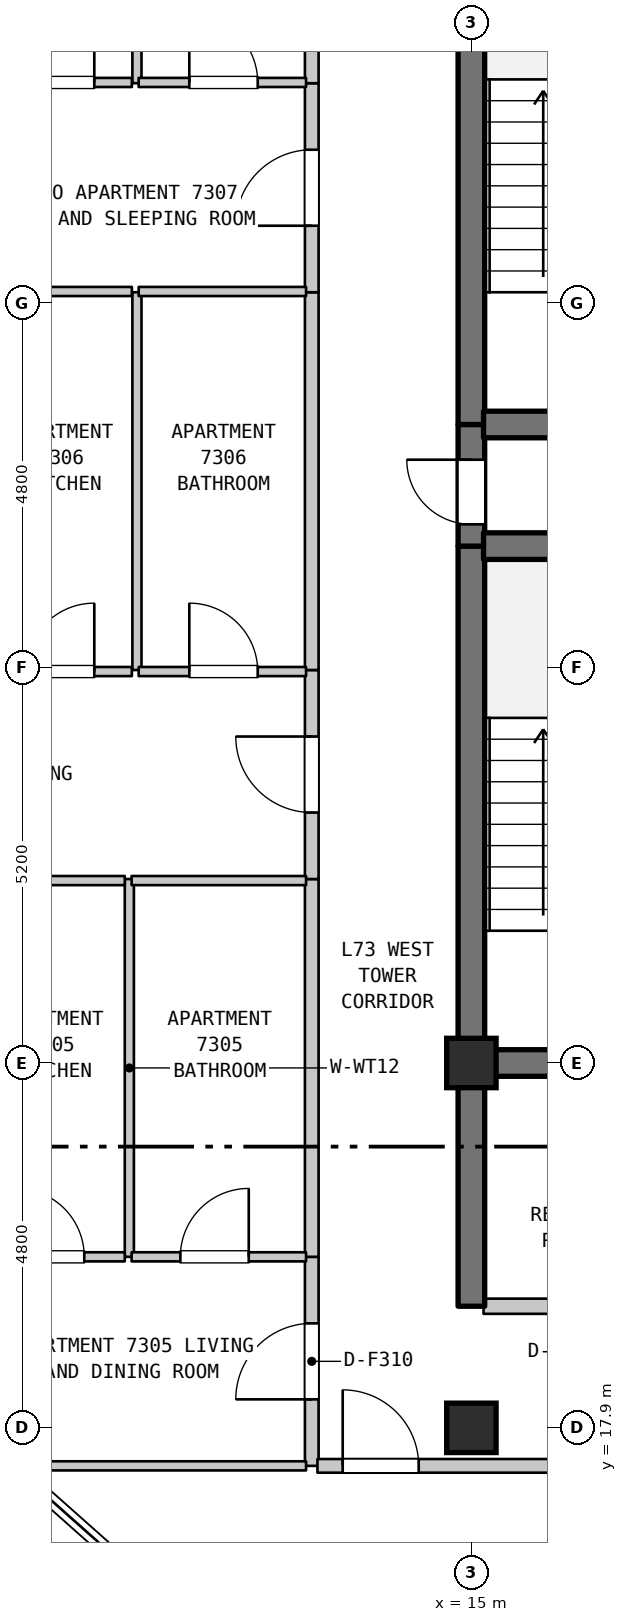
"""IFC4 building model, lengths in metres.
Left out: names, types, materials, properties, quantities, classifications, styles, units other than length and angle.
Written with IfcOpenShell. Run it as: python <this file> out.ifc"""

import sys

from ifc_helpers import new_model, si_unit, direction, frame, frame_2d, origin, origin_2d, place, context, subcontext, project, spatial, rectangle, extrude, element, fill, save


model = new_model("IFC4")
c1 = context("Model", 3, precision=1e-05, world=origin(), true_north=direction((0.0, 1.0)))
c2 = subcontext(c1, "Body", "Model", "MODEL_VIEW")
j1 = project(units=[si_unit("LENGTHUNIT", "METRE"), si_unit("PLANEANGLEUNIT", "RADIAN")], contexts=[c1])
p1 = place(None, origin())
s1 = spatial("IfcSite", under=j1, at=p1, CompositionType="ELEMENT")
p2 = place(p1, origin())
s2 = spatial("IfcBuilding", under=s1, at=p2, CompositionType="ELEMENT")
p3 = place(p2, frame((0.0, 0.0, 291.7)))
s3 = spatial("IfcBuildingStorey", under=s2, at=p3, CompositionType="ELEMENT", Elevation=291.7)
for number, where, z_axis, x_axis in (
    (1, (15.0, 17.9, 0.0), (0.0, 0.0, 1.0), (1.0, 0.0, 0.0)),
    (2, (15.0, 22.7, 0.0), (0.0, 0.0, 1.0), (1.0, 0.0, 0.0)),
):
    element("IfcColumn", number, at=place(p3, frame(where, z_axis=z_axis, x_axis=x_axis)), inside=s3, PredefinedType="COLUMN", context=c2, shape_type="SweptSolid", body=[
        extrude(rectangle(XDim=0.65, YDim=0.65, at=origin_2d()), origin(), (0.0, 0.0, 1.0), 3.7),
    ])
p4 = place(p3, frame((10.5, 20.15, 0.0), z_axis=(0.0, 0.0, 1.0), x_axis=(0.0, 1.0, 0.0)))
e3 = element("IfcWall", 3, at=p4, inside=s3, PredefinedType="PARTITIONING", context=c2, shape_type="SweptSolid", body=[
    extrude(rectangle(XDim=4.97, YDim=0.12, at=frame_2d((2.485, 0.0))), origin(), (0.0, 0.0, 1.0), 3.39),
])
p5 = place(p3, frame((10.6, 27.87, 0.0), z_axis=(0.0, 0.0, 1.0), x_axis=(0.0, 1.0, 0.0)))
e4 = element("IfcWall", 4, at=p5, inside=s3, PredefinedType="PARTITIONING", context=c2, shape_type="SweptSolid", body=[
    extrude(rectangle(XDim=4.97, YDim=0.12, at=frame_2d((2.485, 0.0))), origin(), (0.0, 0.0, 1.0), 3.39),
])
p6 = place(p3, frame((10.6, 35.59, 0.0), z_axis=(0.0, 0.0, 1.0), x_axis=(0.0, 1.0, 0.0)))
e5 = element("IfcWall", 5, at=p6, inside=s3, PredefinedType="PARTITIONING", context=c2, shape_type="SweptSolid", body=[
    extrude(rectangle(XDim=4.51, YDim=0.12, at=frame_2d((2.255, 0.0))), origin(), (0.0, 0.0, 1.0), 3.39),
])
p7 = place(p3, frame((12.9, 17.4, 0.0), z_axis=(0.0, 0.0, 1.0), x_axis=(0.0, 1.0, 0.0)))
e6 = element("IfcWall", 6, at=p7, inside=s3, PredefinedType="STANDARD", context=c2, shape_type="SweptSolid", body=[
    extrude(rectangle(XDim=2.75, YDim=0.18, at=frame_2d((1.375, 0.0))), origin(), (0.0, 0.0, 1.0), 3.39),
])
p8 = place(p7, frame((0.875, 0.0, 0.0)))
e7 = element("IfcOpeningElement", 7, at=p8, cuts=e6, PredefinedType="OPENING", context=c2, shape_type="SweptSolid", body=[
    extrude(rectangle(XDim=1.0, YDim=2.15, at=frame_2d((0.5, 1.075))), frame((0.0, 0.1, 0.0), z_axis=(0.0, -1.0, 0.0), x_axis=(1.0, 0.0, 0.0)), (0.0, 0.0, 1.0), 0.2),
])
p9 = place(p3, frame((12.9, 20.15, 0.0), z_axis=(0.0, 0.0, 1.0), x_axis=(0.0, 1.0, 0.0)))
e8 = element("IfcWall", 8, at=p9, inside=s3, PredefinedType="STANDARD", context=c2, shape_type="SweptSolid", body=[
    extrude(rectangle(XDim=4.97, YDim=0.18, at=frame_2d((2.485, 0.0))), origin(), (0.0, 0.0, 1.0), 3.39),
])
p10 = place(p3, frame((12.9, 25.12, 0.0), z_axis=(0.0, 0.0, 1.0), x_axis=(0.0, 1.0, 0.0)))
e9 = element("IfcWall", 9, at=p10, inside=s3, PredefinedType="STANDARD", context=c2, shape_type="SweptSolid", body=[
    extrude(rectangle(XDim=2.75, YDim=0.18, at=frame_2d((1.375, 0.0))), origin(), (0.0, 0.0, 1.0), 3.39),
])
p11 = place(p10, frame((0.875, 0.0, 0.0)))
e10 = element("IfcOpeningElement", 10, at=p11, cuts=e9, PredefinedType="OPENING", context=c2, shape_type="SweptSolid", body=[
    extrude(rectangle(XDim=1.0, YDim=2.15, at=frame_2d((0.5, 1.075))), frame((0.0, 0.1, 0.0), z_axis=(0.0, -1.0, 0.0), x_axis=(1.0, 0.0, 0.0)), (0.0, 0.0, 1.0), 0.2),
])
p12 = place(p3, frame((12.9, 27.87, 0.0), z_axis=(0.0, 0.0, 1.0), x_axis=(0.0, 1.0, 0.0)))
e11 = element("IfcWall", 11, at=p12, inside=s3, PredefinedType="STANDARD", context=c2, shape_type="SweptSolid", body=[
    extrude(rectangle(XDim=4.97, YDim=0.18, at=frame_2d((2.485, 0.0))), origin(), (0.0, 0.0, 1.0), 3.39),
])
p13 = place(p3, frame((12.9, 32.84, 0.0), z_axis=(0.0, 0.0, 1.0), x_axis=(0.0, 1.0, 0.0)))
e12 = element("IfcWall", 12, at=p13, inside=s3, PredefinedType="STANDARD", context=c2, shape_type="SweptSolid", body=[
    extrude(rectangle(XDim=2.75, YDim=0.18, at=frame_2d((1.375, 0.0))), origin(), (0.0, 0.0, 1.0), 3.39),
])
p14 = place(p13, frame((0.875, 0.0, 0.0)))
e13 = element("IfcOpeningElement", 13, at=p14, cuts=e12, PredefinedType="OPENING", context=c2, shape_type="SweptSolid", body=[
    extrude(rectangle(XDim=1.0, YDim=2.15, at=frame_2d((0.5, 1.075))), frame((0.0, 0.1, 0.0), z_axis=(0.0, -1.0, 0.0), x_axis=(1.0, 0.0, 0.0)), (0.0, 0.0, 1.0), 0.2),
])
p15 = place(p3, frame((12.9, 35.59, 0.0), z_axis=(0.0, 0.0, 1.0), x_axis=(0.0, 1.0, 0.0)))
e14 = element("IfcWall", 14, at=p15, inside=s3, PredefinedType="STANDARD", context=c2, shape_type="SweptSolid", body=[
    extrude(rectangle(XDim=4.51, YDim=0.18, at=frame_2d((2.255, 0.0))), origin(), (0.0, 0.0, 1.0), 3.39),
])
p16 = place(p3, frame((15.0, 19.5, 0.0), z_axis=(0.0, 0.0, 1.0), x_axis=(0.0, 1.0, 0.0)))
e15 = element("IfcWall", 15, at=p16, inside=s3, PredefinedType="SHEAR", context=c2, shape_type="SweptSolid", body=[
    extrude(rectangle(XDim=3.2, YDim=0.35, at=frame_2d((1.6, 0.0))), origin(), (0.0, 0.0, 1.0), 3.39),
])
p17 = place(p3, frame((15.0, 22.7, 0.0), z_axis=(0.0, 0.0, 1.0), x_axis=(0.0, 1.0, 0.0)))
e16 = element("IfcWall", 16, at=p17, inside=s3, PredefinedType="SHEAR", context=c2, shape_type="SweptSolid", body=[
    extrude(rectangle(XDim=6.8, YDim=0.35, at=frame_2d((3.4, 0.0))), origin(), (0.0, 0.0, 1.0), 3.39),
])
p18 = place(p3, frame((15.0, 29.5, 0.0), z_axis=(0.0, 0.0, 1.0), x_axis=(0.0, 1.0, 0.0)))
e17 = element("IfcWall", 17, at=p18, inside=s3, PredefinedType="SHEAR", context=c2, shape_type="SweptSolid", body=[
    extrude(rectangle(XDim=1.6, YDim=0.35, at=frame_2d((0.8, 0.0))), origin(), (0.0, 0.0, 1.0), 3.39),
])
p19 = place(p18, frame((0.287, 0.0, 0.0)))
e18 = element("IfcOpeningElement", 18, at=p19, cuts=e17, PredefinedType="OPENING", context=c2, shape_type="SweptSolid", body=[
    extrude(rectangle(XDim=0.85, YDim=2.1, at=frame_2d((0.425, 1.05))), frame((0.0, 0.185, 0.0), z_axis=(0.0, -1.0, 0.0), x_axis=(1.0, 0.0, 0.0)), (0.0, 0.0, 1.0), 0.37),
])
p20 = place(p3, frame((15.0, 31.1, 0.0), z_axis=(0.0, 0.0, 1.0), x_axis=(0.0, 1.0, 0.0)))
e19 = element("IfcWall", 19, at=p20, inside=s3, PredefinedType="SHEAR", context=c2, shape_type="SweptSolid", body=[
    extrude(rectangle(XDim=6.8, YDim=0.35, at=frame_2d((3.4, 0.0))), origin(), (0.0, 0.0, 1.0), 3.39),
])
p21 = place(p3, frame((8.973, 17.4, 0.0), z_axis=(0.0, 0.0, 1.0), x_axis=(1.0, 0.0, 0.0)))
e20 = element("IfcWall", 20, at=p21, inside=s3, PredefinedType="PARTITIONING", context=c2, shape_type="SweptSolid", body=[
    extrude(rectangle(XDim=3.852, YDim=0.12, at=frame_2d((1.926, 0.0))), origin(), (0.0, 0.0, 1.0), 3.39),
])
p22 = place(p3, frame((12.975, 17.4, 0.0), z_axis=(0.0, 0.0, 1.0), x_axis=(1.0, 0.0, 0.0)))
e21 = element("IfcWall", 21, at=p22, inside=s3, PredefinedType="STANDARD", context=c2, shape_type="SweptSolid", body=[
    extrude(rectangle(XDim=3.18, YDim=0.18, at=frame_2d((1.59, 0.0))), origin(), (0.0, 0.0, 1.0), 3.39),
])
p23 = place(p22, frame((0.332, 0.0, 0.0)))
e22 = element("IfcOpeningElement", 22, at=p23, cuts=e21, PredefinedType="OPENING", context=c2, shape_type="SweptSolid", body=[
    extrude(rectangle(XDim=1.0, YDim=2.15, at=frame_2d((0.5, 1.075))), frame((0.0, 0.1, 0.0), z_axis=(0.0, -1.0, 0.0), x_axis=(1.0, 0.0, 0.0)), (0.0, 0.0, 1.0), 0.2),
])
p24 = place(p3, frame((15.16, 19.5, 0.0), z_axis=(0.0, 0.0, 1.0), x_axis=(1.0, 0.0, 0.0)))
e23 = element("IfcWall", 23, at=p24, inside=s3, PredefinedType="STANDARD", context=c2, shape_type="SweptSolid", body=[
    extrude(rectangle(XDim=3.68, YDim=0.2, at=frame_2d((1.84, 0.0))), origin(), (0.0, 0.0, 1.0), 3.39),
])
p25 = place(p24, frame((1.39, 0.0, 0.0)))
e24 = element("IfcOpeningElement", 24, at=p25, cuts=e23, PredefinedType="OPENING", context=c2, shape_type="SweptSolid", body=[
    extrude(rectangle(XDim=0.9, YDim=2.15, at=frame_2d((0.45, 1.075))), frame((0.0, 0.11, 0.0), z_axis=(0.0, -1.0, 0.0), x_axis=(1.0, 0.0, 0.0)), (0.0, 0.0, 1.0), 0.22),
])
p26 = place(p3, frame((8.473, 20.15, 0.0), z_axis=(0.0, 0.0, 1.0), x_axis=(1.0, 0.0, 0.0)))
e25 = element("IfcWall", 25, at=p26, inside=s3, PredefinedType="PARTITIONING", context=c2, shape_type="SweptSolid", body=[
    extrude(rectangle(XDim=1.967, YDim=0.12, at=frame_2d((0.983, 0.0))), origin(), (0.0, 0.0, 1.0), 3.39),
])
p27 = place(p26, frame((0.534, 0.0, 0.0)))
e26 = element("IfcOpeningElement", 26, at=p27, cuts=e25, PredefinedType="OPENING", context=c2, shape_type="SweptSolid", body=[
    extrude(rectangle(XDim=0.9, YDim=2.15, at=frame_2d((0.45, 1.075))), frame((0.0, 0.07, 0.0), z_axis=(0.0, -1.0, 0.0), x_axis=(1.0, 0.0, 0.0)), (0.0, 0.0, 1.0), 0.14),
])
p28 = place(p3, frame((10.53, 20.15, 0.0), z_axis=(0.0, 0.0, 1.0), x_axis=(1.0, 0.0, 0.0)))
e27 = element("IfcWall", 27, at=p28, inside=s3, PredefinedType="PARTITIONING", context=c2, shape_type="SweptSolid", body=[
    extrude(rectangle(XDim=2.295, YDim=0.12, at=frame_2d((1.147, 0.0))), origin(), (0.0, 0.0, 1.0), 3.39),
])
p29 = place(p28, frame((0.641, 0.0, 0.0)))
e28 = element("IfcOpeningElement", 28, at=p29, cuts=e27, PredefinedType="OPENING", context=c2, shape_type="SweptSolid", body=[
    extrude(rectangle(XDim=0.9, YDim=2.1, at=frame_2d((0.45, 1.05))), frame((0.0, 0.07, 0.0), z_axis=(0.0, -1.0, 0.0), x_axis=(1.0, 0.0, 0.0)), (0.0, 0.0, 1.0), 0.14),
])
p30 = place(p3, frame((15.16, 22.7, 0.0), z_axis=(0.0, 0.0, 1.0), x_axis=(1.0, 0.0, 0.0)))
e29 = element("IfcWall", 29, at=p30, inside=s3, PredefinedType="SHEAR", context=c2, shape_type="SweptSolid", body=[
    extrude(rectangle(XDim=3.68, YDim=0.35, at=frame_2d((1.84, 0.0))), origin(), (0.0, 0.0, 1.0), 3.39),
])
p31 = place(p3, frame((8.473, 25.1, 0.0), z_axis=(0.0, 0.0, 1.0), x_axis=(1.0, 0.0, 0.0)))
e30 = element("IfcWall", 30, at=p31, inside=s3, PredefinedType="PARTITIONING", context=c2, shape_type="SweptSolid", body=[
    extrude(rectangle(XDim=1.967, YDim=0.12, at=frame_2d((0.983, 0.0))), origin(), (0.0, 0.0, 1.0), 3.39),
])
p32 = place(p3, frame((10.53, 25.1, 0.0), z_axis=(0.0, 0.0, 1.0), x_axis=(1.0, 0.0, 0.0)))
e31 = element("IfcWall", 31, at=p32, inside=s3, PredefinedType="PARTITIONING", context=c2, shape_type="SweptSolid", body=[
    extrude(rectangle(XDim=2.295, YDim=0.12, at=frame_2d((1.147, 0.0))), origin(), (0.0, 0.0, 1.0), 3.39),
])
p33 = place(p3, frame((8.645, 27.85, 0.0), z_axis=(0.0, 0.0, 1.0), x_axis=(1.0, 0.0, 0.0)))
e32 = element("IfcWall", 32, at=p33, inside=s3, PredefinedType="PARTITIONING", context=c2, shape_type="SweptSolid", body=[
    extrude(rectangle(XDim=1.888, YDim=0.12, at=frame_2d((0.944, 0.0))), origin(), (0.0, 0.0, 1.0), 3.39),
])
p34 = place(p33, frame((0.494, 0.0, 0.0)))
e33 = element("IfcOpeningElement", 33, at=p34, cuts=e32, PredefinedType="OPENING", context=c2, shape_type="SweptSolid", body=[
    extrude(rectangle(XDim=0.9, YDim=2.15, at=frame_2d((0.45, 1.075))), frame((0.0, 0.07, 0.0), z_axis=(0.0, -1.0, 0.0), x_axis=(1.0, 0.0, 0.0)), (0.0, 0.0, 1.0), 0.14),
])
p35 = place(p3, frame((10.623, 27.85, 0.0), z_axis=(0.0, 0.0, 1.0), x_axis=(1.0, 0.0, 0.0)))
e34 = element("IfcWall", 34, at=p35, inside=s3, PredefinedType="PARTITIONING", context=c2, shape_type="SweptSolid", body=[
    extrude(rectangle(XDim=2.202, YDim=0.12, at=frame_2d((1.101, 0.0))), origin(), (0.0, 0.0, 1.0), 3.39),
])
p36 = place(p35, frame((0.666, 0.0, 0.0)))
e35 = element("IfcOpeningElement", 35, at=p36, cuts=e34, PredefinedType="OPENING", context=c2, shape_type="SweptSolid", body=[
    extrude(rectangle(XDim=0.9, YDim=2.1, at=frame_2d((0.45, 1.05))), frame((0.0, 0.07, 0.0), z_axis=(0.0, -1.0, 0.0), x_axis=(1.0, 0.0, 0.0)), (0.0, 0.0, 1.0), 0.14),
])
for number, where, z_axis, x_axis in (
    (36, (15.16, 29.5, 0.0), (0.0, 0.0, 1.0), (1.0, 0.0, 0.0)),
    (37, (15.16, 31.1, 0.0), (0.0, 0.0, 1.0), (1.0, 0.0, 0.0)),
):
    element("IfcWall", number, at=place(p3, frame(where, z_axis=z_axis, x_axis=x_axis)), inside=s3, PredefinedType="SHEAR", context=c2, shape_type="SweptSolid", body=[
        extrude(rectangle(XDim=3.68, YDim=0.35, at=frame_2d((1.84, 0.0))), origin(), (0.0, 0.0, 1.0), 3.39),
    ])
p37 = place(p3, frame((8.645, 32.85, 0.0), z_axis=(0.0, 0.0, 1.0), x_axis=(1.0, 0.0, 0.0)))
e38 = element("IfcWall", 38, at=p37, inside=s3, PredefinedType="PARTITIONING", context=c2, shape_type="SweptSolid", body=[
    extrude(rectangle(XDim=1.888, YDim=0.12, at=frame_2d((0.944, 0.0))), origin(), (0.0, 0.0, 1.0), 3.39),
])
p38 = place(p3, frame((10.623, 32.85, 0.0), z_axis=(0.0, 0.0, 1.0), x_axis=(1.0, 0.0, 0.0)))
e39 = element("IfcWall", 39, at=p38, inside=s3, PredefinedType="PARTITIONING", context=c2, shape_type="SweptSolid", body=[
    extrude(rectangle(XDim=2.202, YDim=0.12, at=frame_2d((1.101, 0.0))), origin(), (0.0, 0.0, 1.0), 3.39),
])
p39 = place(p3, frame((8.645, 35.6, 0.0), z_axis=(0.0, 0.0, 1.0), x_axis=(1.0, 0.0, 0.0)))
e40 = element("IfcWall", 40, at=p39, inside=s3, PredefinedType="PARTITIONING", context=c2, shape_type="SweptSolid", body=[
    extrude(rectangle(XDim=1.888, YDim=0.12, at=frame_2d((0.944, 0.0))), origin(), (0.0, 0.0, 1.0), 3.39),
])
p40 = place(p39, frame((0.494, 0.0, 0.0)))
e41 = element("IfcOpeningElement", 41, at=p40, cuts=e40, PredefinedType="OPENING", context=c2, shape_type="SweptSolid", body=[
    extrude(rectangle(XDim=0.9, YDim=2.15, at=frame_2d((0.45, 1.075))), frame((0.0, 0.07, 0.0), z_axis=(0.0, -1.0, 0.0), x_axis=(1.0, 0.0, 0.0)), (0.0, 0.0, 1.0), 0.14),
])
p41 = place(p3, frame((10.623, 35.6, 0.0), z_axis=(0.0, 0.0, 1.0), x_axis=(1.0, 0.0, 0.0)))
e42 = element("IfcWall", 42, at=p41, inside=s3, PredefinedType="PARTITIONING", context=c2, shape_type="SweptSolid", body=[
    extrude(rectangle(XDim=2.202, YDim=0.12, at=frame_2d((1.101, 0.0))), origin(), (0.0, 0.0, 1.0), 3.39),
])
p42 = place(p41, frame((0.666, 0.0, 0.0)))
e43 = element("IfcOpeningElement", 43, at=p42, cuts=e42, PredefinedType="OPENING", context=c2, shape_type="SweptSolid", body=[
    extrude(rectangle(XDim=0.9, YDim=2.1, at=frame_2d((0.45, 1.05))), frame((0.0, 0.07, 0.0), z_axis=(0.0, -1.0, 0.0), x_axis=(1.0, 0.0, 0.0)), (0.0, 0.0, 1.0), 0.14),
])
p43 = place(p8, origin())
e44 = element("IfcDoor", 44, at=p43, inside=s3, OperationType="SINGLE_SWING_LEFT", PredefinedType="DOOR", context=c2, shape_type="SweptSolid", body=[
    extrude(rectangle(XDim=1.0, YDim=2.15, at=frame_2d((0.5, 1.075))), frame((0.0, 0.025, 0.0), z_axis=(0.0, -1.0, 0.0), x_axis=(1.0, 0.0, 0.0)), (0.0, 0.0, 1.0), 0.05),
])
fill(e7, e44)
p44 = place(p11, origin())
e45 = element("IfcDoor", 45, at=p44, inside=s3, OperationType="SINGLE_SWING_RIGHT", PredefinedType="DOOR", context=c2, shape_type="SweptSolid", body=[
    extrude(rectangle(XDim=1.0, YDim=2.15, at=frame_2d((0.5, 1.075))), frame((0.0, 0.025, 0.0), z_axis=(0.0, -1.0, 0.0), x_axis=(1.0, 0.0, 0.0)), (0.0, 0.0, 1.0), 0.05),
])
fill(e10, e45)
p45 = place(p14, origin())
e46 = element("IfcDoor", 46, at=p45, inside=s3, OperationType="SINGLE_SWING_LEFT", PredefinedType="DOOR", context=c2, shape_type="SweptSolid", body=[
    extrude(rectangle(XDim=1.0, YDim=2.15, at=frame_2d((0.5, 1.075))), frame((0.0, 0.025, 0.0), z_axis=(0.0, -1.0, 0.0), x_axis=(1.0, 0.0, 0.0)), (0.0, 0.0, 1.0), 0.05),
])
fill(e13, e46)
p46 = place(p19, origin())
e47 = element("IfcDoor", 47, at=p46, inside=s3, OperationType="SINGLE_SWING_RIGHT", PredefinedType="DOOR", context=c2, shape_type="SweptSolid", body=[
    extrude(rectangle(XDim=0.85, YDim=2.1, at=frame_2d((0.425, 1.05))), frame((0.0, 0.025, 0.0), z_axis=(0.0, -1.0, 0.0), x_axis=(1.0, 0.0, 0.0)), (0.0, 0.0, 1.0), 0.05),
])
fill(e18, e47)
p47 = place(p23, origin())
e48 = element("IfcDoor", 48, at=p47, inside=s3, OperationType="SINGLE_SWING_LEFT", PredefinedType="DOOR", context=c2, shape_type="SweptSolid", body=[
    extrude(rectangle(XDim=1.0, YDim=2.15, at=frame_2d((0.5, 1.075))), frame((0.0, 0.025, 0.0), z_axis=(0.0, -1.0, 0.0), x_axis=(1.0, 0.0, 0.0)), (0.0, 0.0, 1.0), 0.05),
])
fill(e22, e48)
p48 = place(p27, origin())
e49 = element("IfcDoor", 49, at=p48, inside=s3, OperationType="SINGLE_SWING_LEFT", PredefinedType="DOOR", context=c2, shape_type="SweptSolid", body=[
    extrude(rectangle(XDim=0.9, YDim=2.15, at=frame_2d((0.45, 1.075))), frame((0.0, 0.025, 0.0), z_axis=(0.0, -1.0, 0.0), x_axis=(1.0, 0.0, 0.0)), (0.0, 0.0, 1.0), 0.05),
])
fill(e26, e49)
p49 = place(p29, origin())
e50 = element("IfcDoor", 50, at=p49, inside=s3, OperationType="SINGLE_SWING_RIGHT", PredefinedType="DOOR", context=c2, shape_type="SweptSolid", body=[
    extrude(rectangle(XDim=0.9, YDim=2.1, at=frame_2d((0.45, 1.05))), frame((0.0, 0.025, 0.0), z_axis=(0.0, -1.0, 0.0), x_axis=(1.0, 0.0, 0.0)), (0.0, 0.0, 1.0), 0.05),
])
fill(e28, e50)
p50 = place(p34, origin())
e51 = element("IfcDoor", 51, at=p50, inside=s3, OperationType="SINGLE_SWING_RIGHT", PredefinedType="DOOR", context=c2, shape_type="SweptSolid", body=[
    extrude(rectangle(XDim=0.9, YDim=2.15, at=frame_2d((0.45, 1.075))), frame((0.0, 0.025, 0.0), z_axis=(0.0, -1.0, 0.0), x_axis=(1.0, 0.0, 0.0)), (0.0, 0.0, 1.0), 0.05),
])
fill(e33, e51)
p51 = place(p36, origin())
e52 = element("IfcDoor", 52, at=p51, inside=s3, OperationType="SINGLE_SWING_LEFT", PredefinedType="DOOR", context=c2, shape_type="SweptSolid", body=[
    extrude(rectangle(XDim=0.9, YDim=2.1, at=frame_2d((0.45, 1.05))), frame((0.0, 0.025, 0.0), z_axis=(0.0, -1.0, 0.0), x_axis=(1.0, 0.0, 0.0)), (0.0, 0.0, 1.0), 0.05),
])
fill(e35, e52)
p52 = place(p40, origin())
e53 = element("IfcDoor", 53, at=p52, inside=s3, OperationType="SINGLE_SWING_RIGHT", PredefinedType="DOOR", context=c2, shape_type="SweptSolid", body=[
    extrude(rectangle(XDim=0.9, YDim=2.15, at=frame_2d((0.45, 1.075))), frame((0.0, 0.025, 0.0), z_axis=(0.0, -1.0, 0.0), x_axis=(1.0, 0.0, 0.0)), (0.0, 0.0, 1.0), 0.05),
])
fill(e41, e53)
p53 = place(p42, origin())
e54 = element("IfcDoor", 54, at=p53, inside=s3, OperationType="SINGLE_SWING_LEFT", PredefinedType="DOOR", context=c2, shape_type="SweptSolid", body=[
    extrude(rectangle(XDim=0.9, YDim=2.1, at=frame_2d((0.45, 1.05))), frame((0.0, 0.025, 0.0), z_axis=(0.0, -1.0, 0.0), x_axis=(1.0, 0.0, 0.0)), (0.0, 0.0, 1.0), 0.05),
])
fill(e43, e54)
save(model, sys.argv[1])
